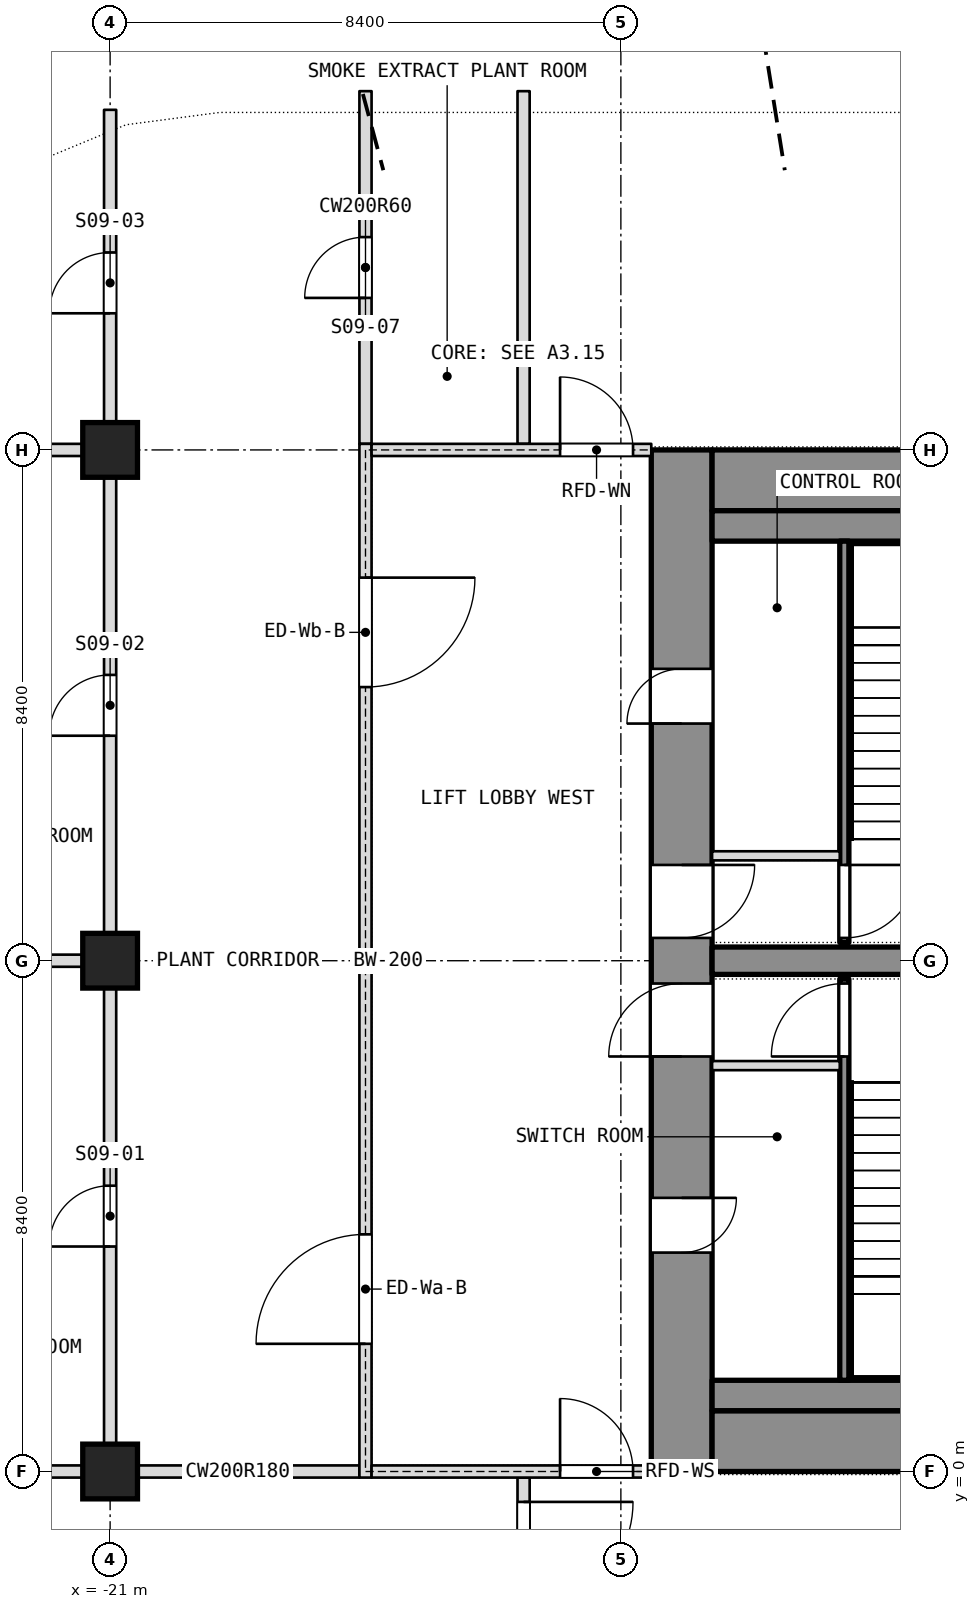
"""IFC4 building model, lengths in metres.
Left out: names, types, materials, properties, quantities, classifications, styles, units other than length and angle.
Written with IfcOpenShell. Run it as: python <this file> out.ifc"""

import sys

from ifc_helpers import new_model, si_unit, direction, frame, frame_2d, origin, origin_2d, place, context, subcontext, project, spatial, rectangle, extrude, element, fill, save


model = new_model("IFC4")
c1 = context("Model", 3, precision=1e-05, world=origin(), true_north=direction((0.0, 1.0)))
c2 = subcontext(c1, "Body", "Model", "MODEL_VIEW")
j1 = project(units=[si_unit("LENGTHUNIT", "METRE"), si_unit("PLANEANGLEUNIT", "RADIAN")], contexts=[c1])
p1 = place(None, origin())
s1 = spatial("IfcSite", under=j1, at=p1, CompositionType="ELEMENT")
p2 = place(p1, origin())
s2 = spatial("IfcBuilding", under=s1, at=p2, CompositionType="ELEMENT")
p3 = place(p2, frame((0.0, 0.0, 169.7)))
s3 = spatial("IfcBuildingStorey", under=s2, at=p3, CompositionType="ELEMENT", Elevation=169.7)
p4 = place(p3, frame((-11.6, 0.0, 0.0), z_axis=(0.0, 0.0, 1.0), x_axis=(0.0, 1.0, 0.0)))
e1 = element("IfcWall", 1, at=p4, inside=s3, PredefinedType="SHEAR", context=c2, shape_type="SweptSolid", body=[
    extrude(rectangle(XDim=16.8, YDim=1.0, at=frame_2d((8.4, 0.0))), origin(), (0.0, 0.0, 1.0), 10.8),
])
p5 = place(p4, frame((3.6, 0.0, 0.0)))
e2 = element("IfcOpeningElement", 2, at=p5, cuts=e1, PredefinedType="OPENING", context=c2, shape_type="SweptSolid", body=[
    extrude(rectangle(XDim=0.9, YDim=2.1, at=frame_2d((0.45, 1.05))), frame((0.0, 0.5, 0.0), z_axis=(0.0, -1.0, 0.0), x_axis=(1.0, 0.0, 0.0)), (0.0, 0.0, 1.0), 1.0),
])
p6 = place(p4, frame((6.825, 0.0, 0.0)))
e3 = element("IfcOpeningElement", 3, at=p6, cuts=e1, PredefinedType="OPENING", context=c2, shape_type="SweptSolid", body=[
    extrude(rectangle(XDim=1.2, YDim=2.1, at=frame_2d((0.6, 1.05))), frame((0.0, 0.5, 0.0), z_axis=(0.0, -1.0, 0.0), x_axis=(1.0, 0.0, 0.0)), (0.0, 0.0, 1.0), 1.0),
])
p7 = place(p4, frame((12.3, 0.0, 0.0)))
e4 = element("IfcOpeningElement", 4, at=p7, cuts=e1, PredefinedType="OPENING", context=c2, shape_type="SweptSolid", body=[
    extrude(rectangle(XDim=0.9, YDim=2.1, at=frame_2d((0.45, 1.05))), frame((0.0, 0.5, 0.0), z_axis=(0.0, -1.0, 0.0), x_axis=(1.0, 0.0, 0.0)), (0.0, 0.0, 1.0), 1.0),
])
p8 = place(p4, frame((8.775, 0.0, 0.0)))
e5 = element("IfcOpeningElement", 5, at=p8, cuts=e1, PredefinedType="OPENING", context=c2, shape_type="SweptSolid", body=[
    extrude(rectangle(XDim=1.2, YDim=2.1, at=frame_2d((0.6, 1.05))), frame((0.0, 0.5, 0.0), z_axis=(0.0, -1.0, 0.0), x_axis=(1.0, 0.0, 0.0)), (0.0, 0.0, 1.0), 1.0),
])
p9 = place(p3, frame((-11.1, 0.5, 0.0), z_axis=(0.0, 0.0, 1.0), x_axis=(1.0, 0.0, 0.0)))
e6 = element("IfcWall", 6, at=p9, inside=s3, PredefinedType="SHEAR", context=c2, shape_type="SweptSolid", body=[
    extrude(rectangle(XDim=22.2, YDim=1.0, at=frame_2d((11.1, 0.0))), origin(), (0.0, 0.0, 1.0), 10.8),
])
p10 = place(p9, frame((10.85, 0.0, 0.0)))
e7 = element("IfcOpeningElement", 7, at=p10, cuts=e6, PredefinedType="OPENING", context=c2, shape_type="SweptSolid", body=[
    extrude(rectangle(XDim=1.4, YDim=2.1, at=frame_2d((0.7, 1.05))), frame((0.0, 0.5, 0.0), z_axis=(0.0, -1.0, 0.0), x_axis=(1.0, 0.0, 0.0)), (0.0, 0.0, 1.0), 1.0),
])
p11 = place(p3, frame((-11.1, 16.3, 0.0), z_axis=(0.0, 0.0, 1.0), x_axis=(1.0, 0.0, 0.0)))
e8 = element("IfcWall", 8, at=p11, inside=s3, PredefinedType="SHEAR", context=c2, shape_type="SweptSolid", body=[
    extrude(rectangle(XDim=22.2, YDim=1.0, at=frame_2d((11.1, 0.0))), origin(), (0.0, 0.0, 1.0), 10.8),
])
p12 = place(p11, frame((10.4, 0.0, 0.0)))
e9 = element("IfcOpeningElement", 9, at=p12, cuts=e8, PredefinedType="OPENING", context=c2, shape_type="SweptSolid", body=[
    extrude(rectangle(XDim=1.4, YDim=2.1, at=frame_2d((0.7, 1.05))), frame((0.0, 0.5, 0.0), z_axis=(0.0, -1.0, 0.0), x_axis=(1.0, 0.0, 0.0)), (0.0, 0.0, 1.0), 1.0),
])
p13 = place(p3, frame((-11.1, 8.4, 0.0), z_axis=(0.0, 0.0, 1.0), x_axis=(1.0, 0.0, 0.0)))
e10 = element("IfcWall", 10, at=p13, inside=s3, PredefinedType="SHEAR", context=c2, shape_type="SweptSolid", body=[
    extrude(rectangle(XDim=6.675, YDim=0.45, at=frame_2d((3.337, 0.0))), origin(), (0.0, 0.0, 1.0), 10.8),
])
for number, where, z_axis, x_axis in (
    (11, (-21.0, 0.0, 0.0), (0.0, 0.0, 1.0), (1.0, 0.0, 0.0)),
    (12, (-21.0, 8.4, 0.0), (0.0, 0.0, 1.0), (1.0, 0.0, 0.0)),
    (13, (-21.0, 16.8, 0.0), (0.0, 0.0, 1.0), (1.0, 0.0, 0.0)),
):
    element("IfcColumn", number, at=place(p3, frame(where, z_axis=z_axis, x_axis=x_axis)), inside=s3, PredefinedType="COLUMN", context=c2, shape_type="SweptSolid", body=[
        extrude(rectangle(XDim=0.9, YDim=0.9, at=origin_2d()), origin(), (0.0, 0.0, 1.0), 10.8),
    ])
p14 = place(p3, frame((-25.5, 0.0, 0.0), z_axis=(0.0, 0.0, 1.0), x_axis=(1.0, 0.0, 0.0)))
e14 = element("IfcWall", 14, at=p14, inside=s3, PredefinedType="PARTITIONING", context=c2, shape_type="SweptSolid", body=[
    extrude(rectangle(XDim=4.4, YDim=0.2, at=frame_2d((2.2, 0.0))), origin(), (0.0, 0.0, 1.0), 10.14),
])
p15 = place(p3, frame((-20.9, 0.0, 0.0), z_axis=(0.0, 0.0, 1.0), x_axis=(1.0, 0.0, 0.0)))
e15 = element("IfcWall", 15, at=p15, inside=s3, PredefinedType="PARTITIONING", context=c2, shape_type="SweptSolid", body=[
    extrude(rectangle(XDim=4.0, YDim=0.2, at=frame_2d((2.0, 0.0))), origin(), (0.0, 0.0, 1.0), 10.14),
])
p16 = place(p3, frame((-25.5, 8.4, 0.0), z_axis=(0.0, 0.0, 1.0), x_axis=(1.0, 0.0, 0.0)))
e16 = element("IfcWall", 16, at=p16, inside=s3, PredefinedType="PARTITIONING", context=c2, shape_type="SweptSolid", body=[
    extrude(rectangle(XDim=4.4, YDim=0.2, at=frame_2d((2.2, 0.0))), origin(), (0.0, 0.0, 1.0), 10.14),
])
p17 = place(p3, frame((-14.2, -22.875, 0.0), z_axis=(0.0, 0.0, 1.0), x_axis=(0.0, 1.0, 0.0)))
e17 = element("IfcWall", 17, at=p17, inside=s3, PredefinedType="PARTITIONING", context=c2, shape_type="SweptSolid", body=[
    extrude(rectangle(XDim=22.775, YDim=0.2, at=frame_2d((11.387, 0.0))), origin(), (0.0, 0.0, 1.0), 10.54),
])
p18 = place(p17, frame((20.575, 0.0, 0.0)))
e18 = element("IfcOpeningElement", 18, at=p18, cuts=e17, PredefinedType="OPENING", context=c2, shape_type="SweptSolid", body=[
    extrude(rectangle(XDim=1.8, YDim=2.1, at=frame_2d((0.9, 1.05))), frame((0.0, 0.1, 0.0), z_axis=(0.0, -1.0, 0.0), x_axis=(1.0, 0.0, 0.0)), (0.0, 0.0, 1.0), 0.2),
])
p19 = place(p3, frame((-14.2, 16.9, 0.0), z_axis=(0.0, 0.0, 1.0), x_axis=(0.0, 1.0, 0.0)))
e19 = element("IfcWall", 19, at=p19, inside=s3, PredefinedType="PARTITIONING", context=c2, shape_type="SweptSolid", body=[
    extrude(rectangle(XDim=5.8, YDim=0.2, at=frame_2d((2.9, 0.0))), origin(), (0.0, 0.0, 1.0), 10.54),
])
p20 = place(p3, frame((-16.8, 16.9, 0.0), z_axis=(0.0, 0.0, 1.0), x_axis=(0.0, 1.0, 0.0)))
e20 = element("IfcWall", 20, at=p20, inside=s3, PredefinedType="PARTITIONING", context=c2, shape_type="SweptSolid", body=[
    extrude(rectangle(XDim=5.8, YDim=0.2, at=frame_2d((2.9, 0.0))), origin(), (0.0, 0.0, 1.0), 10.14),
])
p21 = place(p20, frame((2.4, 0.0, 0.0)))
e21 = element("IfcOpeningElement", 21, at=p21, cuts=e20, PredefinedType="OPENING", context=c2, shape_type="SweptSolid", body=[
    extrude(rectangle(XDim=1.0, YDim=2.1, at=frame_2d((0.5, 1.05))), frame((0.0, 0.1, 0.0), z_axis=(0.0, -1.0, 0.0), x_axis=(1.0, 0.0, 0.0)), (0.0, 0.0, 1.0), 0.2),
])
p22 = place(p3, frame((-25.447, 16.8, 0.0), z_axis=(0.0, 0.0, 1.0), x_axis=(1.0, 0.0, 0.0)))
e22 = element("IfcWall", 22, at=p22, inside=s3, PredefinedType="PARTITIONING", context=c2, shape_type="SweptSolid", body=[
    extrude(rectangle(XDim=4.347, YDim=0.2, at=frame_2d((2.173, 0.0))), origin(), (0.0, 0.0, 1.0), 10.14),
])
p23 = place(p3, frame((-21.0, -0.1, 0.0), z_axis=(0.0, 0.0, 1.0), x_axis=(0.0, 1.0, 0.0)))
e23 = element("IfcWall", 23, at=p23, inside=s3, PredefinedType="PARTITIONING", context=c2, shape_type="SweptSolid", body=[
    extrude(rectangle(XDim=22.493, YDim=0.2, at=frame_2d((11.247, 0.0))), origin(), (0.0, 0.0, 1.0), 10.14),
])
p24 = place(p23, frame((3.8, 0.0, 0.0)))
e24 = element("IfcOpeningElement", 24, at=p24, cuts=e23, PredefinedType="OPENING", context=c2, shape_type="SweptSolid", body=[
    extrude(rectangle(XDim=1.0, YDim=2.1, at=frame_2d((0.5, 1.05))), frame((0.0, 0.1, 0.0), z_axis=(0.0, -1.0, 0.0), x_axis=(1.0, 0.0, 0.0)), (0.0, 0.0, 1.0), 0.2),
])
p25 = place(p23, frame((12.2, 0.0, 0.0)))
e25 = element("IfcOpeningElement", 25, at=p25, cuts=e23, PredefinedType="OPENING", context=c2, shape_type="SweptSolid", body=[
    extrude(rectangle(XDim=1.0, YDim=2.1, at=frame_2d((0.5, 1.05))), frame((0.0, 0.1, 0.0), z_axis=(0.0, -1.0, 0.0), x_axis=(1.0, 0.0, 0.0)), (0.0, 0.0, 1.0), 0.2),
])
p26 = place(p23, frame((19.147, 0.0, 0.0)))
e26 = element("IfcOpeningElement", 26, at=p26, cuts=e23, PredefinedType="OPENING", context=c2, shape_type="SweptSolid", body=[
    extrude(rectangle(XDim=1.0, YDim=2.1, at=frame_2d((0.5, 1.05))), frame((0.0, 0.1, 0.0), z_axis=(0.0, -1.0, 0.0), x_axis=(1.0, 0.0, 0.0)), (0.0, 0.0, 1.0), 0.2),
])
p27 = place(p3, frame((-11.1, 1.25, 0.0), z_axis=(0.0, 0.0, 1.0), x_axis=(1.0, 0.0, 0.0)))
e27 = element("IfcWall", 27, at=p27, inside=s3, PredefinedType="PARTITIONING", context=c2, shape_type="SweptSolid", body=[
    extrude(rectangle(XDim=10.85, YDim=0.5, at=frame_2d((5.425, 0.0))), origin(), (0.0, 0.0, 1.0), 10.54),
])
p28 = place(p3, frame((-11.1, 15.55, 0.0), z_axis=(0.0, 0.0, 1.0), x_axis=(1.0, 0.0, 0.0)))
e28 = element("IfcWall", 28, at=p28, inside=s3, PredefinedType="PARTITIONING", context=c2, shape_type="SweptSolid", body=[
    extrude(rectangle(XDim=10.2, YDim=0.5, at=frame_2d((5.1, 0.0))), origin(), (0.0, 0.0, 1.0), 10.54),
])
p29 = place(p3, frame((-8.925, 1.5, 0.0), z_axis=(0.0, 0.0, 1.0), x_axis=(0.0, 1.0, 0.0)))
e29 = element("IfcWall", 29, at=p29, inside=s3, PredefinedType="SHEAR", context=c2, shape_type="SweptSolid", body=[
    extrude(rectangle(XDim=6.6, YDim=0.15, at=frame_2d((3.3, 0.0))), origin(), (0.0, 0.0, 1.0), 10.54),
])
p30 = place(p29, frame((5.325, 0.0, 0.0)))
e30 = element("IfcOpeningElement", 30, at=p30, cuts=e29, PredefinedType="OPENING", context=c2, shape_type="SweptSolid", body=[
    extrude(rectangle(XDim=1.2, YDim=2.1, at=frame_2d((0.6, 1.05))), frame((0.0, 0.075, 0.0), z_axis=(0.0, -1.0, 0.0), x_axis=(1.0, 0.0, 0.0)), (0.0, 0.0, 1.0), 0.15),
])
p31 = place(p3, frame((-11.1, 6.675, 0.0), z_axis=(0.0, 0.0, 1.0), x_axis=(1.0, 0.0, 0.0)))
e31 = element("IfcWall", 31, at=p31, inside=s3, PredefinedType="PARTITIONING", context=c2, shape_type="SweptSolid", body=[
    extrude(rectangle(XDim=2.1, YDim=0.15, at=frame_2d((1.05, 0.0))), origin(), (0.0, 0.0, 1.0), 10.54),
])
p32 = place(p3, frame((-8.925, 8.7, 0.0), z_axis=(0.0, 0.0, 1.0), x_axis=(0.0, 1.0, 0.0)))
e32 = element("IfcWall", 32, at=p32, inside=s3, PredefinedType="SHEAR", context=c2, shape_type="SweptSolid", body=[
    extrude(rectangle(XDim=6.6, YDim=0.15, at=frame_2d((3.3, 0.0))), origin(), (0.0, 0.0, 1.0), 10.54),
])
p33 = place(p32, frame((0.075, 0.0, 0.0)))
e33 = element("IfcOpeningElement", 33, at=p33, cuts=e32, PredefinedType="OPENING", context=c2, shape_type="SweptSolid", body=[
    extrude(rectangle(XDim=1.2, YDim=2.1, at=frame_2d((0.6, 1.05))), frame((0.0, 0.075, 0.0), z_axis=(0.0, -1.0, 0.0), x_axis=(1.0, 0.0, 0.0)), (0.0, 0.0, 1.0), 0.15),
])
p34 = place(p3, frame((-11.1, 10.125, 0.0), z_axis=(0.0, 0.0, 1.0), x_axis=(1.0, 0.0, 0.0)))
e34 = element("IfcWall", 34, at=p34, inside=s3, PredefinedType="PARTITIONING", context=c2, shape_type="SweptSolid", body=[
    extrude(rectangle(XDim=2.1, YDim=0.15, at=frame_2d((1.05, 0.0))), origin(), (0.0, 0.0, 1.0), 10.54),
])
p35 = place(p3, frame((-16.8, -0.1, 0.0), z_axis=(0.0, 0.0, 1.0), x_axis=(0.0, 1.0, 0.0)))
e35 = element("IfcWall", 35, at=p35, inside=s3, PredefinedType="PARTITIONING", context=c2, shape_type="SweptSolid", body=[
    extrude(rectangle(XDim=17.0, YDim=0.2, at=frame_2d((8.5, 0.0))), origin(), (0.0, 0.0, 1.0), 10.54),
])
p36 = place(p35, frame((2.2, 0.0, 0.0)))
e36 = element("IfcOpeningElement", 36, at=p36, cuts=e35, PredefinedType="OPENING", context=c2, shape_type="SweptSolid", body=[
    extrude(rectangle(XDim=1.8, YDim=2.1, at=frame_2d((0.9, 1.05))), frame((0.0, 0.1, 0.0), z_axis=(0.0, -1.0, 0.0), x_axis=(1.0, 0.0, 0.0)), (0.0, 0.0, 1.0), 0.2),
])
p37 = place(p35, frame((13.0, 0.0, 0.0)))
e37 = element("IfcOpeningElement", 37, at=p37, cuts=e35, PredefinedType="OPENING", context=c2, shape_type="SweptSolid", body=[
    extrude(rectangle(XDim=1.8, YDim=2.1, at=frame_2d((0.9, 1.05))), frame((0.0, 0.1, 0.0), z_axis=(0.0, -1.0, 0.0), x_axis=(1.0, 0.0, 0.0)), (0.0, 0.0, 1.0), 0.2),
])
p38 = place(p3, frame((-16.7, 0.0, 0.0), z_axis=(0.0, 0.0, 1.0), x_axis=(1.0, 0.0, 0.0)))
e38 = element("IfcWall", 38, at=p38, inside=s3, PredefinedType="PARTITIONING", context=c2, shape_type="SweptSolid", body=[
    extrude(rectangle(XDim=4.6, YDim=0.2, at=frame_2d((2.3, 0.0))), origin(), (0.0, 0.0, 1.0), 10.14),
])
p39 = place(p38, frame((3.1, 0.0, 0.0)))
e39 = element("IfcOpeningElement", 39, at=p39, cuts=e38, PredefinedType="OPENING", context=c2, shape_type="SweptSolid", body=[
    extrude(rectangle(XDim=1.2, YDim=2.1, at=frame_2d((0.6, 1.05))), frame((0.0, 0.1, 0.0), z_axis=(0.0, -1.0, 0.0), x_axis=(1.0, 0.0, 0.0)), (0.0, 0.0, 1.0), 0.2),
])
p40 = place(p3, frame((-16.7, 16.8, 0.0), z_axis=(0.0, 0.0, 1.0), x_axis=(1.0, 0.0, 0.0)))
e40 = element("IfcWall", 40, at=p40, inside=s3, PredefinedType="PARTITIONING", context=c2, shape_type="SweptSolid", body=[
    extrude(rectangle(XDim=4.6, YDim=0.2, at=frame_2d((2.3, 0.0))), origin(), (0.0, 0.0, 1.0), 10.14),
])
p41 = place(p40, frame((3.1, 0.0, 0.0)))
e41 = element("IfcOpeningElement", 41, at=p41, cuts=e40, PredefinedType="OPENING", context=c2, shape_type="SweptSolid", body=[
    extrude(rectangle(XDim=1.2, YDim=2.1, at=frame_2d((0.6, 1.05))), frame((0.0, 0.1, 0.0), z_axis=(0.0, -1.0, 0.0), x_axis=(1.0, 0.0, 0.0)), (0.0, 0.0, 1.0), 0.2),
])
p42 = place(p24, origin())
e42 = element("IfcDoor", 42, at=p42, inside=s3, OperationType="SINGLE_SWING_LEFT", PredefinedType="DOOR", context=c2, shape_type="SweptSolid", body=[
    extrude(rectangle(XDim=1.0, YDim=2.1, at=frame_2d((0.5, 1.05))), frame((0.0, 0.025, 0.0), z_axis=(0.0, -1.0, 0.0), x_axis=(1.0, 0.0, 0.0)), (0.0, 0.0, 1.0), 0.05),
])
fill(e24, e42)
p43 = place(p25, origin())
e43 = element("IfcDoor", 43, at=p43, inside=s3, OperationType="SINGLE_SWING_RIGHT", PredefinedType="DOOR", context=c2, shape_type="SweptSolid", body=[
    extrude(rectangle(XDim=1.0, YDim=2.1, at=frame_2d((0.5, 1.05))), frame((0.0, 0.025, 0.0), z_axis=(0.0, -1.0, 0.0), x_axis=(1.0, 0.0, 0.0)), (0.0, 0.0, 1.0), 0.05),
])
fill(e25, e43)
p44 = place(p26, origin())
e44 = element("IfcDoor", 44, at=p44, inside=s3, OperationType="SINGLE_SWING_RIGHT", PredefinedType="DOOR", context=c2, shape_type="SweptSolid", body=[
    extrude(rectangle(XDim=1.0, YDim=2.1, at=frame_2d((0.5, 1.05))), frame((0.0, 0.025, 0.0), z_axis=(0.0, -1.0, 0.0), x_axis=(1.0, 0.0, 0.0)), (0.0, 0.0, 1.0), 0.05),
])
fill(e26, e44)
p45 = place(p21, origin())
e45 = element("IfcDoor", 45, at=p45, inside=s3, OperationType="SINGLE_SWING_RIGHT", PredefinedType="DOOR", context=c2, shape_type="SweptSolid", body=[
    extrude(rectangle(XDim=1.0, YDim=2.1, at=frame_2d((0.5, 1.05))), frame((0.0, 0.025, 0.0), z_axis=(0.0, -1.0, 0.0), x_axis=(1.0, 0.0, 0.0)), (0.0, 0.0, 1.0), 0.05),
])
fill(e21, e45)
p46 = place(p18, origin())
e46 = element("IfcDoor", 46, at=p46, inside=s3, OperationType="DOUBLE_DOOR_SINGLE_SWING", PredefinedType="DOOR", context=c2, shape_type="SweptSolid", body=[
    extrude(rectangle(XDim=1.8, YDim=2.1, at=frame_2d((0.9, 1.05))), frame((0.0, 0.025, 0.0), z_axis=(0.0, -1.0, 0.0), x_axis=(1.0, 0.0, 0.0)), (0.0, 0.0, 1.0), 0.05),
])
fill(e18, e46)
p47 = place(p5, origin())
e47 = element("IfcDoor", 47, at=p47, inside=s3, OperationType="SINGLE_SWING_LEFT", PredefinedType="DOOR", context=c2, shape_type="SweptSolid", body=[
    extrude(rectangle(XDim=0.9, YDim=2.1, at=frame_2d((0.45, 1.05))), frame((0.0, 0.025, 0.0), z_axis=(0.0, -1.0, 0.0), x_axis=(1.0, 0.0, 0.0)), (0.0, 0.0, 1.0), 0.05),
])
fill(e2, e47)
p48 = place(p6, origin())
e48 = element("IfcDoor", 48, at=p48, inside=s3, OperationType="SINGLE_SWING_LEFT", PredefinedType="DOOR", context=c2, shape_type="SweptSolid", body=[
    extrude(rectangle(XDim=1.2, YDim=2.1, at=frame_2d((0.6, 1.05))), frame((0.0, 0.025, 0.0), z_axis=(0.0, -1.0, 0.0), x_axis=(1.0, 0.0, 0.0)), (0.0, 0.0, 1.0), 0.05),
])
fill(e3, e48)
p49 = place(p30, origin())
e49 = element("IfcDoor", 49, at=p49, inside=s3, OperationType="SINGLE_SWING_LEFT", PredefinedType="DOOR", context=c2, shape_type="SweptSolid", body=[
    extrude(rectangle(XDim=1.2, YDim=2.1, at=frame_2d((0.6, 1.05))), frame((0.0, 0.025, 0.0), z_axis=(0.0, -1.0, 0.0), x_axis=(1.0, 0.0, 0.0)), (0.0, 0.0, 1.0), 0.05),
])
fill(e30, e49)
p50 = place(p7, origin())
e50 = element("IfcDoor", 50, at=p50, inside=s3, OperationType="SINGLE_SWING_LEFT", PredefinedType="DOOR", context=c2, shape_type="SweptSolid", body=[
    extrude(rectangle(XDim=0.9, YDim=2.1, at=frame_2d((0.45, 1.05))), frame((0.0, 0.025, 0.0), z_axis=(0.0, -1.0, 0.0), x_axis=(1.0, 0.0, 0.0)), (0.0, 0.0, 1.0), 0.05),
])
fill(e4, e50)
p51 = place(p8, origin())
e51 = element("IfcDoor", 51, at=p51, inside=s3, OperationType="SINGLE_SWING_LEFT", PredefinedType="DOOR", context=c2, shape_type="SweptSolid", body=[
    extrude(rectangle(XDim=1.2, YDim=2.1, at=frame_2d((0.6, 1.05))), frame((0.0, 0.025, 0.0), z_axis=(0.0, -1.0, 0.0), x_axis=(1.0, 0.0, 0.0)), (0.0, 0.0, 1.0), 0.05),
])
fill(e5, e51)
p52 = place(p33, origin())
e52 = element("IfcDoor", 52, at=p52, inside=s3, OperationType="SINGLE_SWING_LEFT", PredefinedType="DOOR", context=c2, shape_type="SweptSolid", body=[
    extrude(rectangle(XDim=1.2, YDim=2.1, at=frame_2d((0.6, 1.05))), frame((0.0, 0.025, 0.0), z_axis=(0.0, -1.0, 0.0), x_axis=(1.0, 0.0, 0.0)), (0.0, 0.0, 1.0), 0.05),
])
fill(e33, e52)
p53 = place(p36, origin())
e53 = element("IfcDoor", 53, at=p53, inside=s3, OperationType="DOUBLE_DOOR_SINGLE_SWING", PredefinedType="DOOR", context=c2, shape_type="SweptSolid", body=[
    extrude(rectangle(XDim=1.8, YDim=2.1, at=frame_2d((0.9, 1.05))), frame((0.0, 0.025, 0.0), z_axis=(0.0, -1.0, 0.0), x_axis=(1.0, 0.0, 0.0)), (0.0, 0.0, 1.0), 0.05),
])
fill(e36, e53)
p54 = place(p37, origin())
e54 = element("IfcDoor", 54, at=p54, inside=s3, OperationType="DOUBLE_DOOR_SINGLE_SWING", PredefinedType="DOOR", context=c2, shape_type="SweptSolid", body=[
    extrude(rectangle(XDim=1.8, YDim=2.1, at=frame_2d((0.9, 1.05))), frame((0.0, 0.025, 0.0), z_axis=(0.0, -1.0, 0.0), x_axis=(1.0, 0.0, 0.0)), (0.0, 0.0, 1.0), 0.05),
])
fill(e37, e54)
p55 = place(p39, origin())
e55 = element("IfcDoor", 55, at=p55, inside=s3, OperationType="SINGLE_SWING_LEFT", PredefinedType="DOOR", context=c2, shape_type="SweptSolid", body=[
    extrude(rectangle(XDim=1.2, YDim=2.1, at=frame_2d((0.6, 1.05))), frame((0.0, 0.025, 0.0), z_axis=(0.0, -1.0, 0.0), x_axis=(1.0, 0.0, 0.0)), (0.0, 0.0, 1.0), 0.05),
])
fill(e39, e55)
p56 = place(p41, origin())
e56 = element("IfcDoor", 56, at=p56, inside=s3, OperationType="SINGLE_SWING_LEFT", PredefinedType="DOOR", context=c2, shape_type="SweptSolid", body=[
    extrude(rectangle(XDim=1.2, YDim=2.1, at=frame_2d((0.6, 1.05))), frame((0.0, 0.025, 0.0), z_axis=(0.0, -1.0, 0.0), x_axis=(1.0, 0.0, 0.0)), (0.0, 0.0, 1.0), 0.05),
])
fill(e41, e56)
save(model, sys.argv[1])
